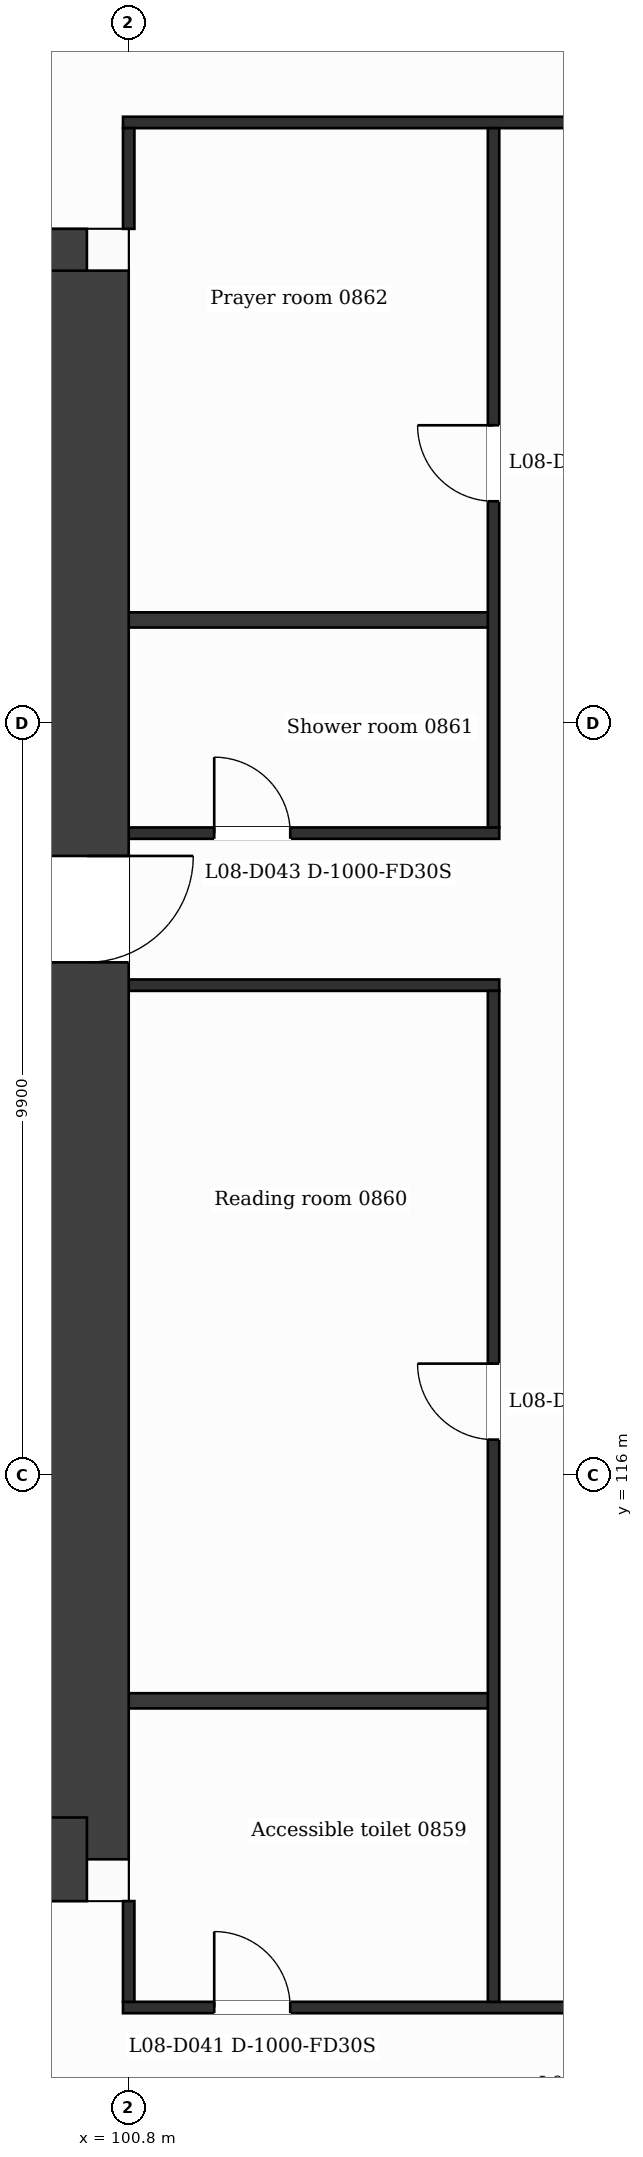
"""IFC4 building model, lengths in metres.
Left out: names, types, materials, properties, quantities, classifications, styles, units other than length and angle.
Written with IfcOpenShell. Run it as: python <this file> out.ifc"""

import sys

from ifc_helpers import new_model, si_unit, direction, frame, frame_2d, origin, place, context, subcontext, project, spatial, rectangle, extrude, element, fill, save


model = new_model("IFC4")
c1 = context("Model", 3, precision=1e-05, world=origin(), true_north=direction((0.0, 1.0)))
c2 = subcontext(c1, "Body", "Model", "MODEL_VIEW")
j1 = project(units=[si_unit("LENGTHUNIT", "METRE"), si_unit("PLANEANGLEUNIT", "RADIAN")], contexts=[c1])
p1 = place(None, origin())
s1 = spatial("IfcSite", under=j1, at=p1, CompositionType="ELEMENT")
p2 = place(p1, origin())
s2 = spatial("IfcBuilding", under=s1, at=p2, CompositionType="ELEMENT")
p3 = place(p2, frame((0.0, 0.0, 46.0)))
s3 = spatial("IfcBuildingStorey", under=s2, at=p3, CompositionType="ELEMENT", Elevation=46.0)
p4 = place(p3, frame((89.112, 131.85, 0.0), z_axis=(0.0, 0.0, 1.0), x_axis=(1.0, 0.0, 0.0)))
e1 = element("IfcWall", 1, at=p4, inside=s3, PredefinedType="SHEAR", context=c2, shape_type="SweptSolid", body=[
    extrude(rectangle(XDim=11.138, YDim=1.1, at=frame_2d((5.569, 0.0))), origin(), (0.0, 0.0, 1.0), 3.5),
])
p5 = place(p4, frame((6.552, 0.0, 0.0)))
e2 = element("IfcOpeningElement", 2, at=p5, cuts=e1, PredefinedType="OPENING", context=c2, shape_type="SweptSolid", body=[
    extrude(rectangle(XDim=1.2, YDim=2.1, at=frame_2d((0.6, 1.05))), frame((0.0, 0.56, 0.0), z_axis=(0.0, -1.0, 0.0), x_axis=(1.0, 0.0, 0.0)), (0.0, 0.0, 1.0), 1.12),
])
p6 = place(p3, frame((100.25, 131.85, 0.0), z_axis=(0.0, 0.0, 1.0), x_axis=(0.0, -1.0, 0.0)))
e3 = element("IfcWall", 3, at=p6, inside=s3, PredefinedType="SHEAR", context=c2, shape_type="SweptSolid", body=[
    extrude(rectangle(XDim=20.9, YDim=1.1, at=frame_2d((10.45, 0.0))), origin(), (0.0, 0.0, 1.0), 3.5),
])
p7 = place(p6, frame((7.7, 0.0, 0.0)))
e4 = element("IfcOpeningElement", 4, at=p7, cuts=e3, PredefinedType="OPENING", context=c2, shape_type="SweptSolid", body=[
    extrude(rectangle(XDim=1.4, YDim=2.1, at=frame_2d((0.7, 1.05))), frame((0.0, 0.56, 0.0), z_axis=(0.0, -1.0, 0.0), x_axis=(1.0, 0.0, 0.0)), (0.0, 0.0, 1.0), 1.12),
])
p8 = place(p3, frame((100.25, 110.95, 0.0), z_axis=(0.0, 0.0, 1.0), x_axis=(-1.0, 0.0, 0.0)))
e5 = element("IfcWall", 5, at=p8, inside=s3, PredefinedType="SHEAR", context=c2, shape_type="SweptSolid", body=[
    extrude(rectangle(XDim=13.952, YDim=1.1, at=frame_2d((6.976, 0.0))), origin(), (0.0, 0.0, 1.0), 3.5),
])
p9 = place(p8, frame((5.748, 0.0, 0.0)))
e6 = element("IfcOpeningElement", 6, at=p9, cuts=e5, PredefinedType="OPENING", context=c2, shape_type="SweptSolid", body=[
    extrude(rectangle(XDim=1.4, YDim=2.1, at=frame_2d((0.7, 1.05))), frame((0.0, 0.56, 0.0), z_axis=(0.0, -1.0, 0.0), x_axis=(1.0, 0.0, 0.0)), (0.0, 0.0, 1.0), 1.12),
])
p10 = place(p3, frame((100.725, 109.0, 0.0), z_axis=(0.0, 0.0, 1.0), x_axis=(1.0, 0.0, 0.0)))
e7 = element("IfcWall", 7, at=p10, inside=s3, PredefinedType="PARTITIONING", context=c2, shape_type="SweptSolid", body=[
    extrude(rectangle(XDim=25.35, YDim=0.15, at=frame_2d((12.675, 0.0))), origin(), (0.0, 0.0, 1.0), 3.18),
])
p11 = place(p10, frame((1.2, 0.0, 0.0)))
e8 = element("IfcOpeningElement", 8, at=p11, cuts=e7, PredefinedType="OPENING", context=c2, shape_type="SweptSolid", body=[
    extrude(rectangle(XDim=1.0, YDim=2.1, at=frame_2d((0.5, 1.05))), frame((0.0, 0.085, 0.0), z_axis=(0.0, -1.0, 0.0), x_axis=(1.0, 0.0, 0.0)), (0.0, 0.0, 1.0), 0.17),
])
p12 = place(p10, frame((12.845, 0.0, 0.0)))
e9 = element("IfcOpeningElement", 9, at=p12, cuts=e7, PredefinedType="OPENING", context=c2, shape_type="SweptSolid", body=[
    extrude(rectangle(XDim=1.0, YDim=2.1, at=frame_2d((0.5, 1.05))), frame((0.0, 0.085, 0.0), z_axis=(0.0, -1.0, 0.0), x_axis=(1.0, 0.0, 0.0)), (0.0, 0.0, 1.0), 0.17),
])
p13 = place(p10, frame((23.15, 0.0, 0.0)))
e10 = element("IfcOpeningElement", 10, at=p13, cuts=e7, PredefinedType="OPENING", context=c2, shape_type="SweptSolid", body=[
    extrude(rectangle(XDim=1.0, YDim=2.1, at=frame_2d((0.5, 1.05))), frame((0.0, 0.085, 0.0), z_axis=(0.0, -1.0, 0.0), x_axis=(1.0, 0.0, 0.0)), (0.0, 0.0, 1.0), 0.17),
])
p14 = place(p3, frame((100.8, 113.035, 0.0), z_axis=(0.0, 0.0, 1.0), x_axis=(1.0, 0.0, 0.0)))
e11 = element("IfcWall", 11, at=p14, inside=s3, PredefinedType="PARTITIONING", context=c2, shape_type="SweptSolid", body=[
    extrude(rectangle(XDim=4.8, YDim=0.2, at=frame_2d((2.4, 0.0))), origin(), (0.0, 0.0, 1.0), 3.18),
])
p15 = place(p3, frame((100.8, 122.45, 0.0), z_axis=(0.0, 0.0, 1.0), x_axis=(1.0, 0.0, 0.0)))
e12 = element("IfcWall", 12, at=p15, inside=s3, PredefinedType="PARTITIONING", context=c2, shape_type="SweptSolid", body=[
    extrude(rectangle(XDim=4.875, YDim=0.15, at=frame_2d((2.438, 0.0))), origin(), (0.0, 0.0, 1.0), 3.18),
])
p16 = place(p3, frame((100.8, 124.45, 0.0), z_axis=(0.0, 0.0, 1.0), x_axis=(1.0, 0.0, 0.0)))
e13 = element("IfcWall", 13, at=p16, inside=s3, PredefinedType="PARTITIONING", context=c2, shape_type="SweptSolid", body=[
    extrude(rectangle(XDim=4.875, YDim=0.15, at=frame_2d((2.438, 0.0))), origin(), (0.0, 0.0, 1.0), 3.18),
])
p17 = place(p16, frame((1.125, 0.0, 0.0)))
e14 = element("IfcOpeningElement", 14, at=p17, cuts=e13, PredefinedType="OPENING", context=c2, shape_type="SweptSolid", body=[
    extrude(rectangle(XDim=1.0, YDim=2.1, at=frame_2d((0.5, 1.05))), frame((0.0, 0.085, 0.0), z_axis=(0.0, -1.0, 0.0), x_axis=(1.0, 0.0, 0.0)), (0.0, 0.0, 1.0), 0.17),
])
p18 = place(p3, frame((100.8, 127.255, 0.0), z_axis=(0.0, 0.0, 1.0), x_axis=(1.0, 0.0, 0.0)))
e15 = element("IfcWall", 15, at=p18, inside=s3, PredefinedType="PARTITIONING", context=c2, shape_type="SweptSolid", body=[
    extrude(rectangle(XDim=4.8, YDim=0.2, at=frame_2d((2.4, 0.0))), origin(), (0.0, 0.0, 1.0), 3.18),
])
p19 = place(p3, frame((100.725, 133.8, 0.0), z_axis=(0.0, 0.0, 1.0), x_axis=(1.0, 0.0, 0.0)))
e16 = element("IfcWall", 16, at=p19, inside=s3, PredefinedType="PARTITIONING", context=c2, shape_type="SweptSolid", body=[
    extrude(rectangle(XDim=25.35, YDim=0.15, at=frame_2d((12.675, 0.0))), origin(), (0.0, 0.0, 1.0), 3.18),
])
p20 = place(p3, frame((100.8, 109.075, 0.0), z_axis=(0.0, 0.0, 1.0), x_axis=(0.0, 1.0, 0.0)))
e17 = element("IfcWall", 17, at=p20, inside=s3, PredefinedType="PARTITIONING", context=c2, shape_type="SweptSolid", body=[
    extrude(rectangle(XDim=1.325, YDim=0.15, at=frame_2d((0.663, 0.0))), origin(), (0.0, 0.0, 1.0), 3.18),
])
p21 = place(p3, frame((100.8, 132.4, 0.0), z_axis=(0.0, 0.0, 1.0), x_axis=(0.0, 1.0, 0.0)))
e18 = element("IfcWall", 18, at=p21, inside=s3, PredefinedType="PARTITIONING", context=c2, shape_type="SweptSolid", body=[
    extrude(rectangle(XDim=1.325, YDim=0.15, at=frame_2d((0.663, 0.0))), origin(), (0.0, 0.0, 1.0), 3.18),
])
p22 = place(p3, frame((105.6, 109.075, 0.0), z_axis=(0.0, 0.0, 1.0), x_axis=(0.0, 1.0, 0.0)))
e19 = element("IfcWall", 19, at=p22, inside=s3, PredefinedType="PARTITIONING", context=c2, shape_type="SweptSolid", body=[
    extrude(rectangle(XDim=13.3, YDim=0.15, at=frame_2d((6.65, 0.0))), origin(), (0.0, 0.0, 1.0), 3.18),
])
p23 = place(p22, frame((7.396, 0.0, 0.0)))
e20 = element("IfcOpeningElement", 20, at=p23, cuts=e19, PredefinedType="OPENING", context=c2, shape_type="SweptSolid", body=[
    extrude(rectangle(XDim=1.0, YDim=2.1, at=frame_2d((0.5, 1.05))), frame((0.0, 0.085, 0.0), z_axis=(0.0, -1.0, 0.0), x_axis=(1.0, 0.0, 0.0)), (0.0, 0.0, 1.0), 0.17),
])
p24 = place(p3, frame((105.6, 124.525, 0.0), z_axis=(0.0, 0.0, 1.0), x_axis=(0.0, 1.0, 0.0)))
e21 = element("IfcWall", 21, at=p24, inside=s3, PredefinedType="PARTITIONING", context=c2, shape_type="SweptSolid", body=[
    extrude(rectangle(XDim=9.2, YDim=0.15, at=frame_2d((4.6, 0.0))), origin(), (0.0, 0.0, 1.0), 3.18),
])
p25 = place(p24, frame((4.291, 0.0, 0.0)))
e22 = element("IfcOpeningElement", 22, at=p25, cuts=e21, PredefinedType="OPENING", context=c2, shape_type="SweptSolid", body=[
    extrude(rectangle(XDim=1.0, YDim=2.1, at=frame_2d((0.5, 1.05))), frame((0.0, 0.085, 0.0), z_axis=(0.0, -1.0, 0.0), x_axis=(1.0, 0.0, 0.0)), (0.0, 0.0, 1.0), 0.17),
])
p26 = place(p11, origin())
e23 = element("IfcDoor", 23, at=p26, inside=s3, OperationType="SINGLE_SWING_LEFT", PredefinedType="DOOR", context=c2, shape_type="SweptSolid", body=[
    extrude(rectangle(XDim=1.0, YDim=2.1, at=frame_2d((0.5, 1.05))), frame((0.0, 0.025, 0.0), z_axis=(0.0, -1.0, 0.0), x_axis=(1.0, 0.0, 0.0)), (0.0, 0.0, 1.0), 0.05),
])
fill(e8, e23)
p27 = place(p23, origin())
e24 = element("IfcDoor", 24, at=p27, inside=s3, OperationType="SINGLE_SWING_RIGHT", PredefinedType="DOOR", context=c2, shape_type="SweptSolid", body=[
    extrude(rectangle(XDim=1.0, YDim=2.1, at=frame_2d((0.5, 1.05))), frame((0.0, 0.025, 0.0), z_axis=(0.0, -1.0, 0.0), x_axis=(1.0, 0.0, 0.0)), (0.0, 0.0, 1.0), 0.05),
])
fill(e20, e24)
p28 = place(p17, origin())
e25 = element("IfcDoor", 25, at=p28, inside=s3, OperationType="SINGLE_SWING_LEFT", PredefinedType="DOOR", context=c2, shape_type="SweptSolid", body=[
    extrude(rectangle(XDim=1.0, YDim=2.1, at=frame_2d((0.5, 1.05))), frame((0.0, 0.025, 0.0), z_axis=(0.0, -1.0, 0.0), x_axis=(1.0, 0.0, 0.0)), (0.0, 0.0, 1.0), 0.05),
])
fill(e14, e25)
p29 = place(p25, origin())
e26 = element("IfcDoor", 26, at=p29, inside=s3, OperationType="SINGLE_SWING_RIGHT", PredefinedType="DOOR", context=c2, shape_type="SweptSolid", body=[
    extrude(rectangle(XDim=1.0, YDim=2.1, at=frame_2d((0.5, 1.05))), frame((0.0, 0.025, 0.0), z_axis=(0.0, -1.0, 0.0), x_axis=(1.0, 0.0, 0.0)), (0.0, 0.0, 1.0), 0.05),
])
fill(e22, e26)
p30 = place(p7, origin())
e27 = element("IfcDoor", 27, at=p30, inside=s3, OperationType="SINGLE_SWING_LEFT", PredefinedType="DOOR", context=c2, shape_type="SweptSolid", body=[
    extrude(rectangle(XDim=1.4, YDim=2.1, at=frame_2d((0.7, 1.05))), frame((0.0, 0.025, 0.0), z_axis=(0.0, -1.0, 0.0), x_axis=(1.0, 0.0, 0.0)), (0.0, 0.0, 1.0), 0.05),
])
fill(e4, e27)
save(model, sys.argv[1])
